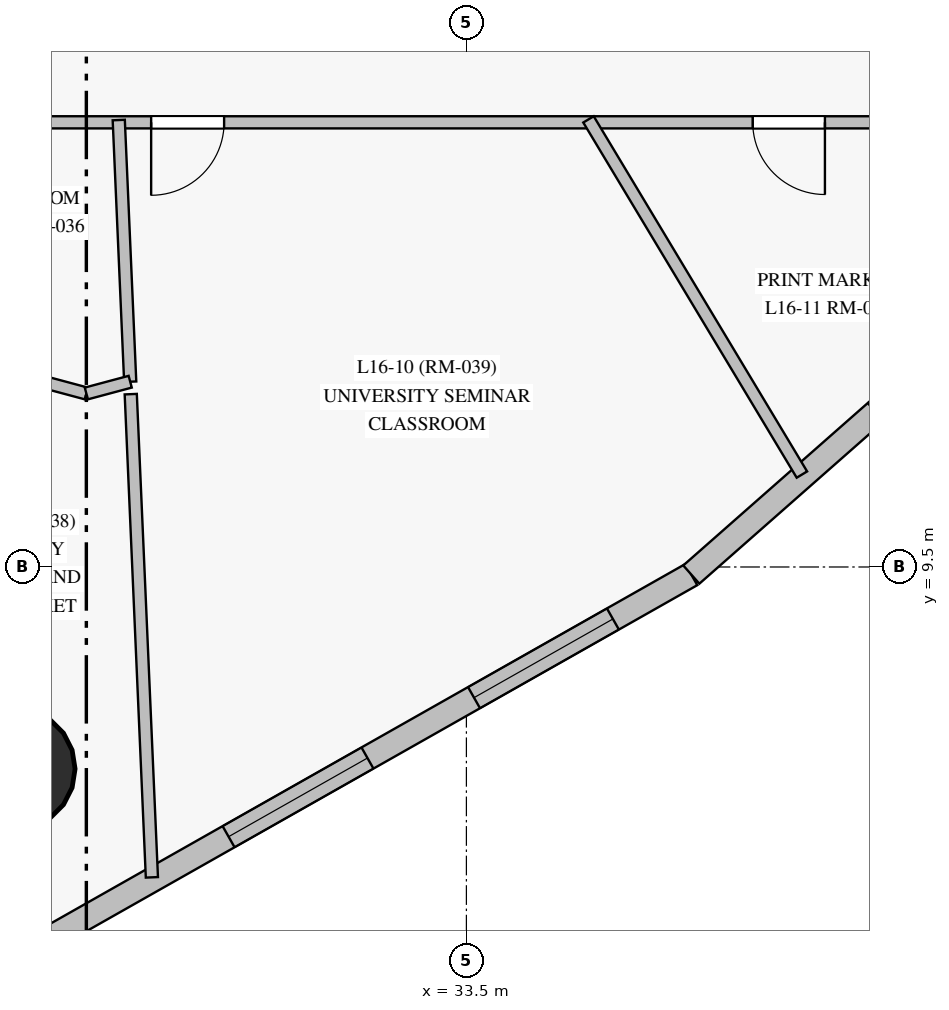
"""IFC4 building model, lengths in metres.
Left out: names, types, materials, properties, quantities, classifications, styles, units other than length and angle.
Written with IfcOpenShell. Run it as: python <this file> out.ifc"""

import sys

from ifc_helpers import new_model, si_unit, direction, frame, frame_2d, origin, origin_with_axes, origin_2d, place, context, subcontext, project, spatial, rectangle, circle, extrude, source, transform, mapped, element, fill, save


model = new_model("IFC4")
c1 = context("Model", 3, precision=1e-05, world=origin(), true_north=direction((0.0, 1.0)))
c2 = subcontext(c1, "Body", "Model", "MODEL_VIEW")
j1 = project(units=[si_unit("LENGTHUNIT", "METRE"), si_unit("PLANEANGLEUNIT", "RADIAN")], contexts=[c1])
p1 = place(None, origin())
s1 = spatial("IfcSite", under=j1, at=p1, CompositionType="ELEMENT")
p2 = place(p1, origin())
s2 = spatial("IfcBuilding", under=s1, at=p2, CompositionType="ELEMENT")
p3 = place(p2, frame((0.0, 0.0, 62.5)))
s3 = spatial("IfcBuildingStorey", under=s2, at=p3, CompositionType="ELEMENT", Elevation=62.5)
m1 = source(origin_with_axes(), c2, "Body", "SweptSolid", [
    extrude(circle(Radius=0.8, at=origin_2d()), origin(), (0.0, 0.0, 1.0), 3.6),
])
p4 = place(p3, frame((27.552, 6.844, 0.0), z_axis=(0.0, 0.0, 1.0), x_axis=(1.0, 0.0, 0.0)))
e1 = element("IfcColumn", 1, at=p4, inside=s3, PredefinedType="COLUMN", context=c2, shape_type="MappedRepresentation", body=[
    mapped(m1, transform((0.0, 0.0, 0.0), scale=1.0)),
])
p5 = place(p3, frame((23.131, 1.85, 0.0), z_axis=(0.0, 0.0, 1.0), x_axis=(0.870097602534, 0.492879459974, 0.0)))
e2 = element("IfcWall", 2, at=p5, inside=s3, PredefinedType="SOLIDWALL", context=c2, shape_type="SweptSolid", body=[
    extrude(rectangle(XDim=15.318, YDim=0.32, at=frame_2d((7.659, 0.0))), origin(), (0.0, 0.0, 1.0), 3.35),
])
p6 = place(p5, frame((3.175, 0.0, 0.85)))
e3 = element("IfcOpeningElement", 3, at=p6, cuts=e2, PredefinedType="OPENING", context=c2, shape_type="SweptSolid", body=[
    extrude(rectangle(XDim=2.1, YDim=1.95, at=frame_2d((1.05, 0.975))), frame((0.0, 0.17, 0.0), z_axis=(0.0, -1.0, 0.0), x_axis=(1.0, 0.0, 0.0)), (0.0, 0.0, 1.0), 0.34),
])
p7 = place(p5, frame((8.322, 0.0, 0.85)))
e4 = element("IfcOpeningElement", 4, at=p7, cuts=e2, PredefinedType="OPENING", context=c2, shape_type="SweptSolid", body=[
    extrude(rectangle(XDim=2.1, YDim=1.95, at=frame_2d((1.05, 0.975))), frame((0.0, 0.17, 0.0), z_axis=(0.0, -1.0, 0.0), x_axis=(1.0, 0.0, 0.0)), (0.0, 0.0, 1.0), 0.34),
])
p8 = place(p5, frame((12.033, 0.0, 0.85)))
e5 = element("IfcOpeningElement", 5, at=p8, cuts=e2, PredefinedType="OPENING", context=c2, shape_type="SweptSolid", body=[
    extrude(rectangle(XDim=2.1, YDim=1.95, at=frame_2d((1.05, 0.975))), frame((0.0, 0.17, 0.0), z_axis=(0.0, -1.0, 0.0), x_axis=(1.0, 0.0, 0.0)), (0.0, 0.0, 1.0), 0.34),
])
p9 = place(p3, frame((36.459, 9.4, 0.0), z_axis=(0.0, 0.0, 1.0), x_axis=(0.750582546648, 0.660776695009, 0.0)))
e6 = element("IfcWall", 6, at=p9, inside=s3, PredefinedType="SOLIDWALL", context=c2, shape_type="SweptSolid", body=[
    extrude(rectangle(XDim=10.651, YDim=0.32, at=frame_2d((5.326, 0.0))), origin(), (0.0, 0.0, 1.0), 3.35),
])
p10 = place(p9, frame((3.234, 0.0, 0.85)))
e7 = element("IfcOpeningElement", 7, at=p10, cuts=e6, PredefinedType="OPENING", context=c2, shape_type="SweptSolid", body=[
    extrude(rectangle(XDim=2.1, YDim=1.95, at=frame_2d((1.05, 0.975))), frame((0.0, 0.17, 0.0), z_axis=(0.0, -1.0, 0.0), x_axis=(1.0, 0.0, 0.0)), (0.0, 0.0, 1.0), 0.34),
])
p11 = place(p9, frame((7.225, 0.0, 0.85)))
e8 = element("IfcOpeningElement", 8, at=p11, cuts=e6, PredefinedType="OPENING", context=c2, shape_type="SweptSolid", body=[
    extrude(rectangle(XDim=2.1, YDim=1.95, at=frame_2d((1.05, 0.975))), frame((0.0, 0.17, 0.0), z_axis=(0.0, -1.0, 0.0), x_axis=(1.0, 0.0, 0.0)), (0.0, 0.0, 1.0), 0.34),
])
p12 = place(p3, frame((40.25, 15.35, 0.0), z_axis=(0.0, 0.0, 1.0), x_axis=(-1.0, 0.0, 0.0)))
e9 = element("IfcWall", 9, at=p12, inside=s3, PredefinedType="PARTITIONING", context=c2, shape_type="SweptSolid", body=[
    extrude(rectangle(XDim=29.75, YDim=0.16, at=frame_2d((14.875, 0.0))), origin(), (0.0, 0.0, 1.0), 2.7),
])
p13 = place(p12, frame((27.263, 0.0, 0.0)))
e10 = element("IfcOpeningElement", 10, at=p13, cuts=e9, PredefinedType="OPENING", context=c2, shape_type="SweptSolid", body=[
    extrude(rectangle(XDim=0.96, YDim=2.15, at=frame_2d((0.48, 1.075))), frame((0.0, 0.09, 0.0), z_axis=(0.0, -1.0, 0.0), x_axis=(1.0, 0.0, 0.0)), (0.0, 0.0, 1.0), 0.18),
])
p14 = place(p12, frame((22.778, 0.0, 0.0)))
e11 = element("IfcOpeningElement", 11, at=p14, cuts=e9, PredefinedType="OPENING", context=c2, shape_type="SweptSolid", body=[
    extrude(rectangle(XDim=0.95, YDim=2.15, at=frame_2d((0.475, 1.075))), frame((0.0, 0.09, 0.0), z_axis=(0.0, -1.0, 0.0), x_axis=(1.0, 0.0, 0.0)), (0.0, 0.0, 1.0), 0.18),
])
p15 = place(p12, frame((14.4, 0.0, 0.0)))
e12 = element("IfcOpeningElement", 12, at=p15, cuts=e9, PredefinedType="OPENING", context=c2, shape_type="SweptSolid", body=[
    extrude(rectangle(XDim=0.96, YDim=2.15, at=frame_2d((0.48, 1.075))), frame((0.0, 0.09, 0.0), z_axis=(0.0, -1.0, 0.0), x_axis=(1.0, 0.0, 0.0)), (0.0, 0.0, 1.0), 0.18),
])
p16 = place(p12, frame((9.938, 0.0, 0.0)))
e13 = element("IfcOpeningElement", 13, at=p16, cuts=e9, PredefinedType="OPENING", context=c2, shape_type="SweptSolid", body=[
    extrude(rectangle(XDim=0.96, YDim=2.15, at=frame_2d((0.48, 1.075))), frame((0.0, 0.09, 0.0), z_axis=(0.0, -1.0, 0.0), x_axis=(1.0, 0.0, 0.0)), (0.0, 0.0, 1.0), 0.18),
])
p17 = place(p12, frame((2.033, 0.0, 0.0)))
e14 = element("IfcOpeningElement", 14, at=p17, cuts=e9, PredefinedType="OPENING", context=c2, shape_type="SweptSolid", body=[
    extrude(rectangle(XDim=0.95, YDim=2.15, at=frame_2d((0.475, 1.075))), frame((0.0, 0.09, 0.0), z_axis=(0.0, -1.0, 0.0), x_axis=(1.0, 0.0, 0.0)), (0.0, 0.0, 1.0), 0.18),
])
p18 = place(p3, frame((28.5, 11.783, 0.0), z_axis=(0.0, 0.0, 1.0), x_axis=(-0.965919870225, 0.258841272413, 0.0)))
e15 = element("IfcWall", 15, at=p18, inside=s3, PredefinedType="PARTITIONING", context=c2, shape_type="SweptSolid", body=[
    extrude(rectangle(XDim=7.618, YDim=0.16, at=frame_2d((3.809, 0.0))), origin(), (0.0, 0.0, 1.0), 2.75),
])
p19 = place(p18, frame((6.584, 0.0, 0.0)))
e16 = element("IfcOpeningElement", 16, at=p19, cuts=e15, PredefinedType="OPENING", context=c2, shape_type="SweptSolid", body=[
    extrude(rectangle(XDim=0.86, YDim=2.1, at=frame_2d((0.43, 1.05))), frame((0.0, 0.09, 0.0), z_axis=(0.0, -1.0, 0.0), x_axis=(1.0, 0.0, 0.0)), (0.0, 0.0, 1.0), 0.18),
])
p20 = place(p18, frame((4.477, 0.0, 0.0)))
e17 = element("IfcOpeningElement", 17, at=p20, cuts=e15, PredefinedType="OPENING", context=c2, shape_type="SweptSolid", body=[
    extrude(rectangle(XDim=0.95, YDim=2.15, at=frame_2d((0.475, 1.075))), frame((0.0, 0.09, 0.0), z_axis=(0.0, -1.0, 0.0), x_axis=(1.0, 0.0, 0.0)), (0.0, 0.0, 1.0), 0.18),
])
p21 = place(p18, frame((3.044, 0.0, 0.0)))
e18 = element("IfcOpeningElement", 18, at=p21, cuts=e15, PredefinedType="OPENING", context=c2, shape_type="SweptSolid", body=[
    extrude(rectangle(XDim=0.95, YDim=2.15, at=frame_2d((0.475, 1.075))), frame((0.0, 0.09, 0.0), z_axis=(0.0, -1.0, 0.0), x_axis=(1.0, 0.0, 0.0)), (0.0, 0.0, 1.0), 0.18),
])
p22 = place(p18, frame((1.429, 0.0, 0.0)))
e19 = element("IfcOpeningElement", 19, at=p22, cuts=e15, PredefinedType="OPENING", context=c2, shape_type="SweptSolid", body=[
    extrude(rectangle(XDim=0.95, YDim=2.15, at=frame_2d((0.475, 1.075))), frame((0.0, 0.09, 0.0), z_axis=(0.0, -1.0, 0.0), x_axis=(1.0, 0.0, 0.0)), (0.0, 0.0, 1.0), 0.18),
])
p23 = place(p3, frame((29.084, 11.774, 0.0), z_axis=(0.0, 0.0, 1.0), x_axis=(0.043703642138, -0.999044539379, 0.0)))
e20 = element("IfcWall", 20, at=p23, inside=s3, PredefinedType="PARTITIONING", context=c2, shape_type="SweptSolid", body=[
    extrude(rectangle(XDim=6.363, YDim=0.16, at=frame_2d((3.181, 0.0))), origin(), (0.0, 0.0, 1.0), 3.35),
])
p24 = place(p3, frame((35.106, 15.389, 0.0), z_axis=(0.0, 0.0, 1.0), x_axis=(0.515022535582, -0.857176637481, 0.0)))
e21 = element("IfcWall", 21, at=p24, inside=s3, PredefinedType="PARTITIONING", context=c2, shape_type="SweptSolid", body=[
    extrude(rectangle(XDim=5.451, YDim=0.16, at=frame_2d((2.726, 0.0))), origin(), (0.0, 0.0, 1.0), 3.35),
])
p25 = place(p3, frame((28.927, 15.38, 0.0), z_axis=(0.0, 0.0, 1.0), x_axis=(0.043717029745, -0.999043953643, 0.0)))
e22 = element("IfcWall", 22, at=p25, inside=s3, PredefinedType="PARTITIONING", context=c2, shape_type="SweptSolid", body=[
    extrude(rectangle(XDim=3.446, YDim=0.16, at=frame_2d((1.723, 0.0))), origin(), (0.0, 0.0, 1.0), 3.35),
])
p26 = place(p3, frame((29.077, 11.938, 0.0), z_axis=(0.0, 0.0, 1.0), x_axis=(-0.96586777343, -0.259035604211, 0.0)))
e23 = element("IfcWall", 23, at=p26, inside=s3, PredefinedType="PARTITIONING", context=c2, shape_type="SweptSolid", body=[
    extrude(rectangle(XDim=0.598, YDim=0.16, at=frame_2d((0.299, 0.0))), origin(), (0.0, 0.0, 1.0), 2.75),
])
m2 = source(origin_with_axes(), c2, "Body", "SweptSolid", [
    extrude(rectangle(XDim=2.1, YDim=1.95, at=frame_2d((1.05, 0.975))), frame((0.0, 0.03, 0.0), z_axis=(0.0, -1.0, 0.0), x_axis=(1.0, 0.0, 0.0)), (0.0, 0.0, 1.0), 0.06),
])
p27 = place(p7, origin())
e24 = element("IfcWindow", 24, at=p27, inside=s3, PartitioningType="SINGLE_PANEL", PredefinedType="WINDOW", context=c2, shape_type="MappedRepresentation", body=[
    mapped(m2, transform((0.0, 0.0, 0.0), scale=1.0)),
])
fill(e4, e24)
p28 = place(p8, origin())
e25 = element("IfcWindow", 25, at=p28, inside=s3, PartitioningType="SINGLE_PANEL", PredefinedType="WINDOW", context=c2, shape_type="MappedRepresentation", body=[
    mapped(m2, transform((0.0, 0.0, 0.0), scale=1.0)),
])
fill(e5, e25)
m3 = source(origin_with_axes(), c2, "Body", "SweptSolid", [
    extrude(rectangle(XDim=0.96, YDim=2.15, at=frame_2d((0.48, 1.075))), frame((0.0, 0.025, 0.0), z_axis=(0.0, -1.0, 0.0), x_axis=(1.0, 0.0, 0.0)), (0.0, 0.0, 1.0), 0.05),
])
p29 = place(p16, origin())
e26 = element("IfcDoor", 26, at=p29, inside=s3, OperationType="SINGLE_SWING_RIGHT", PredefinedType="DOOR", context=c2, shape_type="MappedRepresentation", body=[
    mapped(m3, transform((0.0, 0.0, 0.0), scale=1.0)),
])
fill(e13, e26)
m4 = source(origin_with_axes(), c2, "Body", "SweptSolid", [
    extrude(rectangle(XDim=0.95, YDim=2.15, at=frame_2d((0.475, 1.075))), frame((0.0, 0.025, 0.0), z_axis=(0.0, -1.0, 0.0), x_axis=(1.0, 0.0, 0.0)), (0.0, 0.0, 1.0), 0.05),
])
p30 = place(p17, origin())
e27 = element("IfcDoor", 27, at=p30, inside=s3, OperationType="SINGLE_SWING_LEFT", PredefinedType="DOOR", context=c2, shape_type="MappedRepresentation", body=[
    mapped(m4, transform((0.0, 0.0, 0.0), scale=1.0)),
])
fill(e14, e27)
save(model, sys.argv[1])
